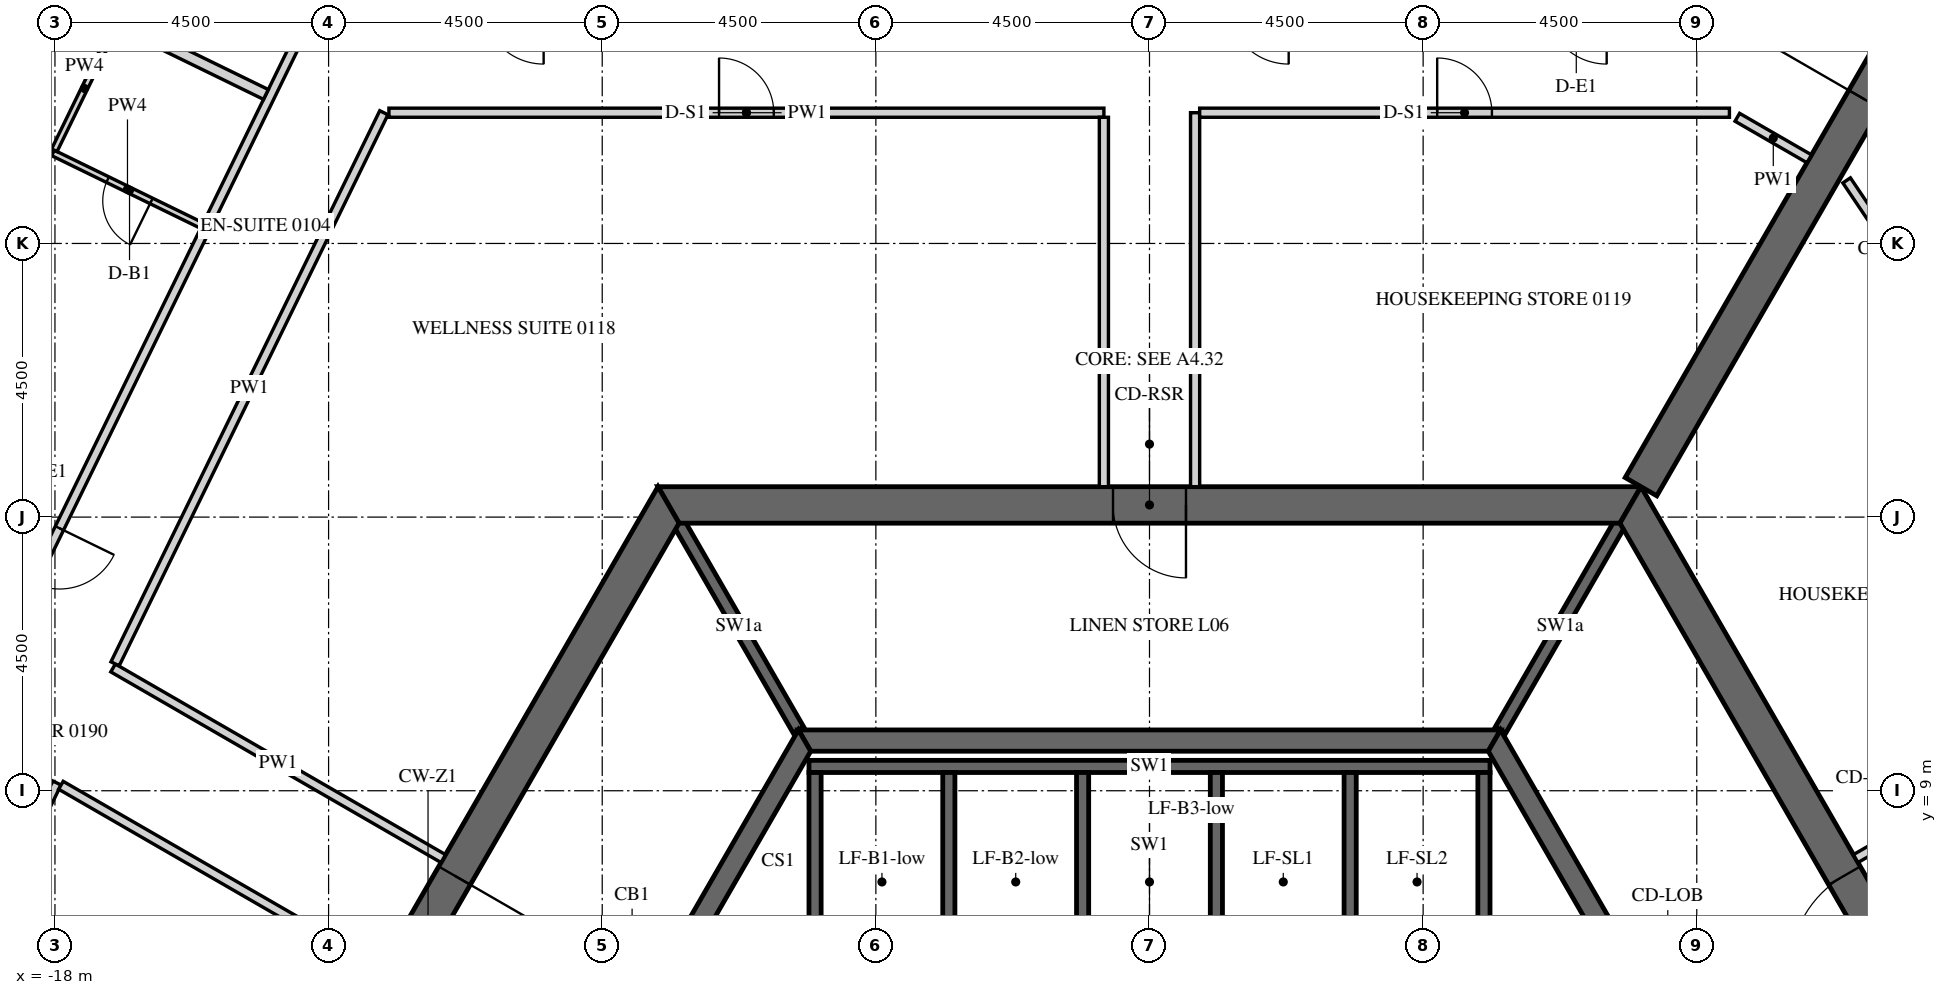
"""IFC4 building model, lengths in metres.
Left out: names, types, materials, properties, quantities, classifications, styles, units other than length and angle.
Written with IfcOpenShell. Run it as: python <this file> out.ifc"""

import sys

from ifc_helpers import new_model, si_unit, direction, frame, frame_2d, origin, place, context, subcontext, project, spatial, polyline, rectangle, outline, extrude, element, fill, save


model = new_model("IFC4")
c1 = context("Model", 3, precision=1e-05, world=origin(), true_north=direction((0.0, 1.0)))
c2 = subcontext(c1, "Body", "Model", "MODEL_VIEW")
j1 = project(units=[si_unit("LENGTHUNIT", "METRE"), si_unit("PLANEANGLEUNIT", "RADIAN")], contexts=[c1])
p1 = place(None, origin())
s1 = spatial("IfcSite", under=j1, at=p1, CompositionType="ELEMENT")
p2 = place(p1, origin())
s2 = spatial("IfcBuilding", under=s1, at=p2, CompositionType="ELEMENT")
p3 = place(p2, frame((0.0, 0.0, 37.5)))
s3 = spatial("IfcBuildingStorey", under=s2, at=p3, CompositionType="ELEMENT", Elevation=37.5)
p4 = place(p3, frame((-7.91, 13.7, -0.15), z_axis=(0.0, 0.0, 1.0), x_axis=(-0.499999880136, -0.866025472988, 0.0)))
e1 = element("IfcWall", 1, at=p4, inside=s3, PredefinedType="SHEAR", context=c2, shape_type="SweptSolid", body=[
    extrude(outline(polyline([(-0.173, -0.3), (15.993, -0.3), (15.646, 0.3), (0.173, 0.3), (-0.173, -0.3)])), origin(), (0.0, 0.0, 1.0), 3.9),
])
p5 = place(p4, frame((7.039, 0.0, 0.15)))
e2 = element("IfcOpeningElement", 2, at=p5, cuts=e1, PredefinedType="OPENING", context=c2, shape_type="SweptSolid", body=[
    extrude(rectangle(XDim=1.8, YDim=2.4, at=frame_2d((0.9, 1.2))), frame((0.0, 0.31, 0.0), z_axis=(0.0, -1.0, 0.0), x_axis=(1.0, 0.0, 0.0)), (0.0, 0.0, 1.0), 0.62),
])
p6 = place(p3, frame((15.819, 0.0, -0.15), z_axis=(0.0, 0.0, 1.0), x_axis=(-0.499999880136, 0.866025472988, 0.0)))
e3 = element("IfcWall", 3, at=p6, inside=s3, PredefinedType="SHEAR", context=c2, shape_type="SweptSolid", body=[
    extrude(outline(polyline([(-0.173, -0.3), (15.993, -0.3), (15.646, 0.3), (0.173, 0.3), (-0.173, -0.3)])), origin(), (0.0, 0.0, 1.0), 3.9),
])
p7 = place(p6, frame((6.981, 0.0, 0.15)))
e4 = element("IfcOpeningElement", 4, at=p7, cuts=e3, PredefinedType="OPENING", context=c2, shape_type="SweptSolid", body=[
    extrude(rectangle(XDim=1.8, YDim=2.4, at=frame_2d((0.9, 1.2))), frame((0.0, 0.31, 0.0), z_axis=(0.0, -1.0, 0.0), x_axis=(1.0, 0.0, 0.0)), (0.0, 0.0, 1.0), 0.62),
])
p8 = place(p3, frame((7.91, 13.7, -0.15), z_axis=(0.0, 0.0, 1.0), x_axis=(-1.0, 0.0, 0.0)))
e5 = element("IfcWall", 5, at=p8, inside=s3, PredefinedType="SHEAR", context=c2, shape_type="SweptSolid", body=[
    extrude(outline(polyline([(-0.173, -0.3), (15.993, -0.3), (15.646, 0.3), (0.173, 0.3), (-0.173, -0.3)])), origin(), (0.0, 0.0, 1.0), 3.9),
])
p9 = place(p8, frame((7.31, 0.0, 0.15)))
e6 = element("IfcOpeningElement", 6, at=p9, cuts=e5, PredefinedType="OPENING", context=c2, shape_type="SweptSolid", body=[
    extrude(rectangle(XDim=1.2, YDim=2.4, at=frame_2d((0.6, 1.2))), frame((0.0, 0.31, 0.0), z_axis=(0.0, -1.0, 0.0), x_axis=(1.0, 0.0, 0.0)), (0.0, 0.0, 1.0), 0.62),
])
p10 = place(p3, frame((8.083, 14.0, -0.15), z_axis=(0.0, 0.0, 1.0), x_axis=(0.499997680643, 0.866026742862, 0.0)))
e7 = element("IfcWall", 7, at=p10, inside=s3, PredefinedType="SHEAR", context=c2, shape_type="SweptSolid", body=[
    extrude(rectangle(XDim=16.509, YDim=0.6, at=frame_2d((8.254, 0.0))), origin(), (0.0, 0.0, 1.0), 3.9),
])
p11 = place(p10, frame((7.354, 0.0, 0.15)))
e8 = element("IfcOpeningElement", 8, at=p11, cuts=e7, PredefinedType="OPENING", context=c2, shape_type="SweptSolid", body=[
    extrude(rectangle(XDim=1.8, YDim=2.4, at=frame_2d((0.9, 1.2))), frame((0.0, 0.31, 0.0), z_axis=(0.0, -1.0, 0.0), x_axis=(1.0, 0.0, 0.0)), (0.0, 0.0, 1.0), 0.62),
])
p12 = place(p3, frame((-5.673, 9.825, -0.15), z_axis=(0.0, 0.0, 1.0), x_axis=(-0.499995046907, -0.866028263435, 0.0)))
e9 = element("IfcWall", 9, at=p12, inside=s3, PredefinedType="SHEAR", context=c2, shape_type="SweptSolid", body=[
    extrude(outline(polyline([(-0.101, -0.175), (11.446, -0.175), (11.244, 0.175), (0.101, 0.175), (-0.101, -0.175)])), origin(), (0.0, 0.0, 1.0), 3.9),
])
p13 = place(p12, frame((4.801, 0.0, 0.15)))
e10 = element("IfcOpeningElement", 10, at=p13, cuts=e9, PredefinedType="OPENING", context=c2, shape_type="SweptSolid", body=[
    extrude(rectangle(XDim=1.8, YDim=2.4, at=frame_2d((0.9, 1.2))), frame((0.0, 0.185, 0.0), z_axis=(0.0, -1.0, 0.0), x_axis=(1.0, 0.0, 0.0)), (0.0, 0.0, 1.0), 0.37),
])
p14 = place(p3, frame((11.345, 0.0, -0.15), z_axis=(0.0, 0.0, 1.0), x_axis=(-0.499995046907, 0.866028263435, 0.0)))
e11 = element("IfcWall", 11, at=p14, inside=s3, PredefinedType="SHEAR", context=c2, shape_type="SweptSolid", body=[
    extrude(outline(polyline([(-0.101, -0.175), (11.446, -0.175), (11.244, 0.175), (0.101, 0.175), (-0.101, -0.175)])), origin(), (0.0, 0.0, 1.0), 3.9),
])
p15 = place(p14, frame((4.744, 0.0, 0.15)))
e12 = element("IfcOpeningElement", 12, at=p15, cuts=e11, PredefinedType="OPENING", context=c2, shape_type="SweptSolid", body=[
    extrude(rectangle(XDim=1.8, YDim=2.4, at=frame_2d((0.9, 1.2))), frame((0.0, 0.185, 0.0), z_axis=(0.0, -1.0, 0.0), x_axis=(1.0, 0.0, 0.0)), (0.0, 0.0, 1.0), 0.37),
])
p16 = place(p3, frame((5.673, 9.825, -0.15), z_axis=(0.0, 0.0, 1.0), x_axis=(-1.0, 0.0, 0.0)))
e13 = element("IfcWall", 13, at=p16, inside=s3, PredefinedType="SHEAR", context=c2, shape_type="SweptSolid", body=[
    extrude(outline(polyline([(-0.101, -0.175), (11.446, -0.175), (11.244, 0.175), (0.101, 0.175), (-0.101, -0.175)])), origin(), (0.0, 0.0, 1.0), 3.9),
])
p17 = place(p3, frame((-5.6, 9.4, -0.25), z_axis=(0.0, 0.0, 1.0), x_axis=(1.0, 0.0, 0.0)))
e14 = element("IfcWall", 14, at=p17, inside=s3, PredefinedType="SHEAR", context=c2, shape_type="SweptSolid", body=[
    extrude(rectangle(XDim=11.2, YDim=0.2, at=frame_2d((5.6, 0.0))), origin(), (0.0, 0.0, 1.0), 3.9),
])
for number, where, z_axis, x_axis in (
    (15, (-5.5, 6.4, -0.25), (0.0, 0.0, 1.0), (0.0, 1.0, 0.0)),
    (16, (-3.3, 6.4, -0.25), (0.0, 0.0, 1.0), (0.0, 1.0, 0.0)),
    (17, (-1.1, 6.4, -0.25), (0.0, 0.0, 1.0), (0.0, 1.0, 0.0)),
    (18, (1.1, 6.4, -0.25), (0.0, 0.0, 1.0), (0.0, 1.0, 0.0)),
    (19, (3.3, 6.4, -0.25), (0.0, 0.0, 1.0), (0.0, 1.0, 0.0)),
    (20, (5.5, 6.4, -0.25), (0.0, 0.0, 1.0), (0.0, 1.0, 0.0)),
):
    element("IfcWall", number, at=place(p3, frame(where, z_axis=z_axis, x_axis=x_axis)), inside=s3, PredefinedType="SHEAR", context=c2, shape_type="SweptSolid", body=[
        extrude(rectangle(XDim=2.9, YDim=0.2, at=frame_2d((1.45, 0.0))), origin(), (0.0, 0.0, 1.0), 3.9),
    ])
for number, where, z_axis, x_axis in (
    (21, (5.773, 10.0, -0.15), (0.0, 0.0, 1.0), (0.5, 0.866, 0.0)),
    (22, (-5.773, 10.0, -0.15), (0.0, 0.0, 1.0), (-0.5, 0.866, 0.0)),
):
    element("IfcWall", number, at=place(p3, frame(where, z_axis=z_axis, x_axis=x_axis)), inside=s3, PredefinedType="SHEAR", context=c2, shape_type="SweptSolid", body=[
        extrude(rectangle(XDim=3.926, YDim=0.2, at=frame_2d((1.963, 0.0))), origin(), (0.0, 0.0, 1.0), 3.9),
    ])
p18 = place(p3, frame((-13.752, 21.875, 0.0), z_axis=(0.0, 0.0, 1.0), x_axis=(-0.438374473378, -0.898792423806, 0.0)))
e23 = element("IfcWall", 23, at=p18, inside=s3, PredefinedType="PARTITIONING", context=c2, shape_type="SweptSolid", body=[
    extrude(rectangle(XDim=21.918, YDim=0.15, at=frame_2d((10.959, 0.0))), origin(), (0.0, 0.0, 1.0), 2.988),
])
p19 = place(p18, frame((9.521, 0.0, 0.0)))
e24 = element("IfcOpeningElement", 24, at=p19, cuts=e23, PredefinedType="OPENING", context=c2, shape_type="SweptSolid", body=[
    extrude(rectangle(XDim=1.0, YDim=2.1, at=frame_2d((0.5, 1.05))), frame((0.0, 0.085, 0.0), z_axis=(0.0, -1.0, 0.0), x_axis=(1.0, 0.0, 0.0)), (0.0, 0.0, 1.0), 0.17),
])
p20 = place(p18, frame((17.211, 0.0, 0.0)))
e25 = element("IfcOpeningElement", 25, at=p20, cuts=e23, PredefinedType="OPENING", context=c2, shape_type="SweptSolid", body=[
    extrude(rectangle(XDim=1.0, YDim=2.1, at=frame_2d((0.5, 1.05))), frame((0.0, 0.085, 0.0), z_axis=(0.0, -1.0, 0.0), x_axis=(1.0, 0.0, 0.0)), (0.0, 0.0, 1.0), 0.17),
])
p21 = place(p3, frame((-11.614, 7.884, 0.0), z_axis=(0.0, 0.0, 1.0), x_axis=(-0.866025438137, 0.4999999405, 0.0)))
e26 = element("IfcWall", 26, at=p21, inside=s3, PredefinedType="PARTITIONING", context=c2, shape_type="SweptSolid", body=[
    extrude(rectangle(XDim=6.271, YDim=0.15, at=frame_2d((3.135, 0.0))), origin(), (0.0, 0.0, 1.0), 2.988),
])
p22 = place(p3, frame((-17.011, 11.087, 0.0), z_axis=(0.0, 0.0, 1.0), x_axis=(0.43836877185, 0.898795204631, 0.0)))
e27 = element("IfcWall", 27, at=p22, inside=s3, PredefinedType="PARTITIONING", context=c2, shape_type="SweptSolid", body=[
    extrude(rectangle(XDim=10.083, YDim=0.15, at=frame_2d((5.042, 0.0))), origin(), (0.0, 0.0, 1.0), 2.988),
])
p23 = place(p3, frame((-12.508, 20.15, 0.0), z_axis=(0.0, 0.0, 1.0), x_axis=(1.0, 0.0, 0.0)))
e28 = element("IfcWall", 28, at=p23, inside=s3, PredefinedType="PARTITIONING", context=c2, shape_type="SweptSolid", body=[
    extrude(rectangle(XDim=11.758, YDim=0.15, at=frame_2d((5.879, 0.0))), origin(), (0.0, 0.0, 1.0), 2.988),
])
p24 = place(p23, frame((5.429, 0.0, 0.0)))
e29 = element("IfcOpeningElement", 29, at=p24, cuts=e28, PredefinedType="OPENING", context=c2, shape_type="SweptSolid", body=[
    extrude(rectangle(XDim=0.9, YDim=2.1, at=frame_2d((0.45, 1.05))), frame((0.0, 0.085, 0.0), z_axis=(0.0, -1.0, 0.0), x_axis=(1.0, 0.0, 0.0)), (0.0, 0.0, 1.0), 0.17),
])
p25 = place(p3, frame((-0.75, 20.075, 0.0), z_axis=(0.0, 0.0, 1.0), x_axis=(0.0, -1.0, 0.0)))
e30 = element("IfcWall", 30, at=p25, inside=s3, PredefinedType="PARTITIONING", context=c2, shape_type="SweptSolid", body=[
    extrude(rectangle(XDim=6.075, YDim=0.15, at=frame_2d((3.038, 0.0))), origin(), (0.0, 0.0, 1.0), 2.988),
])
p26 = place(p3, frame((0.75, 14.0, 0.0), z_axis=(0.0, 0.0, 1.0), x_axis=(0.0, 1.0, 0.0)))
e31 = element("IfcWall", 31, at=p26, inside=s3, PredefinedType="PARTITIONING", context=c2, shape_type="SweptSolid", body=[
    extrude(rectangle(XDim=6.15, YDim=0.15, at=frame_2d((3.075, 0.0))), origin(), (0.0, 0.0, 1.0), 2.988),
])
p27 = place(p3, frame((0.825, 20.15, 0.0), z_axis=(0.0, 0.0, 1.0), x_axis=(1.0, 0.0, 0.0)))
e32 = element("IfcWall", 32, at=p27, inside=s3, PredefinedType="PARTITIONING", context=c2, shape_type="SweptSolid", body=[
    extrude(rectangle(XDim=8.712, YDim=0.15, at=frame_2d((4.356, 0.0))), origin(), (0.0, 0.0, 1.0), 2.988),
])
p28 = place(p27, frame((3.906, 0.0, 0.0)))
e33 = element("IfcOpeningElement", 33, at=p28, cuts=e32, PredefinedType="OPENING", context=c2, shape_type="SweptSolid", body=[
    extrude(rectangle(XDim=0.9, YDim=2.1, at=frame_2d((0.45, 1.05))), frame((0.0, 0.085, 0.0), z_axis=(0.0, -1.0, 0.0), x_axis=(1.0, 0.0, 0.0)), (0.0, 0.0, 1.0), 0.17),
])
p29 = place(p3, frame((9.667, 20.075, 0.0), z_axis=(0.0, 0.0, 1.0), x_axis=(0.866000994684, -0.500042275419, 0.0)))
e34 = element("IfcWall", 34, at=p29, inside=s3, PredefinedType="PARTITIONING", context=c2, shape_type="SweptSolid", body=[
    extrude(rectangle(XDim=1.366, YDim=0.15, at=frame_2d((0.683, 0.0))), origin(), (0.0, 0.0, 1.0), 2.988),
])
p30 = place(p3, frame((-22.219, 0.41, 0.0), z_axis=(0.0, 0.0, 1.0), x_axis=(0.438391891827, 0.898783927972, 0.0)))
e35 = element("IfcWall", 35, at=p30, inside=s3, PredefinedType="PARTITIONING", context=c2, shape_type="SweptSolid", body=[
    extrude(rectangle(XDim=9.699, YDim=0.15, at=frame_2d((4.85, 0.0))), origin(), (0.0, 0.0, 1.0), 2.988),
])
p31 = place(p30, frame((4.4, 0.0, 0.0)))
e36 = element("IfcOpeningElement", 36, at=p31, cuts=e35, PredefinedType="OPENING", context=c2, shape_type="SweptSolid", body=[
    extrude(rectangle(XDim=0.9, YDim=2.1, at=frame_2d((0.45, 1.05))), frame((0.0, 0.085, 0.0), z_axis=(0.0, -1.0, 0.0), x_axis=(1.0, 0.0, 0.0)), (0.0, 0.0, 1.0), 0.17),
])
p32 = place(p3, frame((-17.902, 9.09, 0.0), z_axis=(0.0, 0.0, 1.0), x_axis=(0.866036368755, -0.499981007633, 0.0)))
e37 = element("IfcWall", 37, at=p32, inside=s3, PredefinedType="PARTITIONING", context=c2, shape_type="SweptSolid", body=[
    extrude(rectangle(XDim=6.049, YDim=0.15, at=frame_2d((3.024, 0.0))), origin(), (0.0, 0.0, 1.0), 2.988),
])
p33 = place(p3, frame((11.465, 19.037, 0.0), z_axis=(0.0, 0.0, 1.0), x_axis=(0.559196064773, -0.829035440221, 0.0)))
e38 = element("IfcWall", 38, at=p33, inside=s3, PredefinedType="PARTITIONING", context=c2, shape_type="SweptSolid", body=[
    extrude(rectangle(XDim=9.757, YDim=0.15, at=frame_2d((4.878, 0.0))), origin(), (0.0, 0.0, 1.0), 2.988),
])
p34 = place(p33, frame((4.428, 0.0, 0.0)))
e39 = element("IfcOpeningElement", 39, at=p34, cuts=e38, PredefinedType="OPENING", context=c2, shape_type="SweptSolid", body=[
    extrude(rectangle(XDim=0.9, YDim=2.1, at=frame_2d((0.45, 1.05))), frame((0.0, 0.085, 0.0), z_axis=(0.0, -1.0, 0.0), x_axis=(1.0, 0.0, 0.0)), (0.0, 0.0, 1.0), 0.17),
])
p35 = place(p3, frame((16.855, 10.911, 0.0), z_axis=(0.0, 0.0, 1.0), x_axis=(-0.866020343444, -0.500008764664, 0.0)))
e40 = element("IfcWall", 40, at=p35, inside=s3, PredefinedType="PARTITIONING", context=c2, shape_type="SweptSolid", body=[
    extrude(rectangle(XDim=6.053, YDim=0.15, at=frame_2d((3.026, 0.0))), origin(), (0.0, 0.0, 1.0), 2.988),
])
p36 = place(p3, frame((-21.204, 23.706, 0.0), z_axis=(0.0, 0.0, 1.0), x_axis=(0.898796252669, -0.438366623032, 0.0)))
e41 = element("IfcWall", 41, at=p36, inside=s3, PredefinedType="PARTITIONING", context=c2, shape_type="SweptSolid", body=[
    extrude(rectangle(XDim=7.425, YDim=0.18, at=frame_2d((3.712, 0.0))), origin(), (0.0, 0.0, 1.0), 2.988),
])
p37 = place(p3, frame((-15.583, 18.293, 0.0), z_axis=(0.0, 0.0, 1.0), x_axis=(-0.898791692788, 0.43837597217, 0.0)))
e42 = element("IfcWall", 42, at=p37, inside=s3, PredefinedType="PARTITIONING", context=c2, shape_type="SweptSolid", body=[
    extrude(rectangle(XDim=2.725, YDim=0.1, at=frame_2d((1.363, 0.0))), origin(), (0.0, 0.0, 1.0), 2.988),
])
p38 = place(p37, frame((0.925, 0.0, 0.0)))
e43 = element("IfcOpeningElement", 43, at=p38, cuts=e42, PredefinedType="OPENING", context=c2, shape_type="SweptSolid", body=[
    extrude(rectangle(XDim=0.8, YDim=2.1, at=frame_2d((0.4, 1.05))), frame((0.0, 0.06, 0.0), z_axis=(0.0, -1.0, 0.0), x_axis=(1.0, 0.0, 0.0)), (0.0, 0.0, 1.0), 0.12),
])
p39 = place(p3, frame((-18.01, 19.533, 0.0), z_axis=(0.0, 0.0, 1.0), x_axis=(0.438376807268, 0.898791285477, 0.0)))
e44 = element("IfcWall", 44, at=p39, inside=s3, PredefinedType="PARTITIONING", context=c2, shape_type="SweptSolid", body=[
    extrude(rectangle(XDim=2.26, YDim=0.1, at=frame_2d((1.13, 0.0))), origin(), (0.0, 0.0, 1.0), 2.988),
])
p40 = place(p5, origin())
e45 = element("IfcDoor", 45, at=p40, inside=s3, OperationType="DOUBLE_DOOR_SINGLE_SWING", PredefinedType="DOOR", context=c2, shape_type="SweptSolid", body=[
    extrude(rectangle(XDim=1.8, YDim=2.4, at=frame_2d((0.9, 1.2))), frame((0.0, 0.025, 0.0), z_axis=(0.0, -1.0, 0.0), x_axis=(1.0, 0.0, 0.0)), (0.0, 0.0, 1.0), 0.05),
])
fill(e2, e45)
p41 = place(p7, origin())
e46 = element("IfcDoor", 46, at=p41, inside=s3, OperationType="DOUBLE_DOOR_SINGLE_SWING", PredefinedType="DOOR", context=c2, shape_type="SweptSolid", body=[
    extrude(rectangle(XDim=1.8, YDim=2.4, at=frame_2d((0.9, 1.2))), frame((0.0, 0.025, 0.0), z_axis=(0.0, -1.0, 0.0), x_axis=(1.0, 0.0, 0.0)), (0.0, 0.0, 1.0), 0.05),
])
fill(e4, e46)
p42 = place(p9, origin())
e47 = element("IfcDoor", 47, at=p42, inside=s3, OperationType="SINGLE_SWING_LEFT", PredefinedType="DOOR", context=c2, shape_type="SweptSolid", body=[
    extrude(rectangle(XDim=1.2, YDim=2.4, at=frame_2d((0.6, 1.2))), frame((0.0, 0.025, 0.0), z_axis=(0.0, -1.0, 0.0), x_axis=(1.0, 0.0, 0.0)), (0.0, 0.0, 1.0), 0.05),
])
fill(e6, e47)
p43 = place(p11, origin())
e48 = element("IfcDoor", 48, at=p43, inside=s3, OperationType="DOUBLE_DOOR_SINGLE_SWING", PredefinedType="DOOR", context=c2, shape_type="SweptSolid", body=[
    extrude(rectangle(XDim=1.8, YDim=2.4, at=frame_2d((0.9, 1.2))), frame((0.0, 0.025, 0.0), z_axis=(0.0, -1.0, 0.0), x_axis=(1.0, 0.0, 0.0)), (0.0, 0.0, 1.0), 0.05),
])
fill(e8, e48)
p44 = place(p19, origin())
e49 = element("IfcDoor", 49, at=p44, inside=s3, OperationType="SINGLE_SWING_LEFT", PredefinedType="DOOR", context=c2, shape_type="SweptSolid", body=[
    extrude(rectangle(XDim=1.0, YDim=2.1, at=frame_2d((0.5, 1.05))), frame((0.0, 0.025, 0.0), z_axis=(0.0, -1.0, 0.0), x_axis=(1.0, 0.0, 0.0)), (0.0, 0.0, 1.0), 0.05),
])
fill(e24, e49)
p45 = place(p38, origin())
e50 = element("IfcDoor", 50, at=p45, inside=s3, OperationType="SINGLE_SWING_RIGHT", PredefinedType="DOOR", context=c2, shape_type="SweptSolid", body=[
    extrude(rectangle(XDim=0.8, YDim=2.1, at=frame_2d((0.4, 1.05))), frame((0.0, 0.025, 0.0), z_axis=(0.0, -1.0, 0.0), x_axis=(1.0, 0.0, 0.0)), (0.0, 0.0, 1.0), 0.05),
])
fill(e43, e50)
p46 = place(p24, origin())
e51 = element("IfcDoor", 51, at=p46, inside=s3, OperationType="SINGLE_SWING_RIGHT", PredefinedType="DOOR", context=c2, shape_type="SweptSolid", body=[
    extrude(rectangle(XDim=0.9, YDim=2.1, at=frame_2d((0.45, 1.05))), frame((0.0, 0.025, 0.0), z_axis=(0.0, -1.0, 0.0), x_axis=(1.0, 0.0, 0.0)), (0.0, 0.0, 1.0), 0.05),
])
fill(e29, e51)
p47 = place(p28, origin())
e52 = element("IfcDoor", 52, at=p47, inside=s3, OperationType="SINGLE_SWING_RIGHT", PredefinedType="DOOR", context=c2, shape_type="SweptSolid", body=[
    extrude(rectangle(XDim=0.9, YDim=2.1, at=frame_2d((0.45, 1.05))), frame((0.0, 0.025, 0.0), z_axis=(0.0, -1.0, 0.0), x_axis=(1.0, 0.0, 0.0)), (0.0, 0.0, 1.0), 0.05),
])
fill(e33, e52)
save(model, sys.argv[1])
